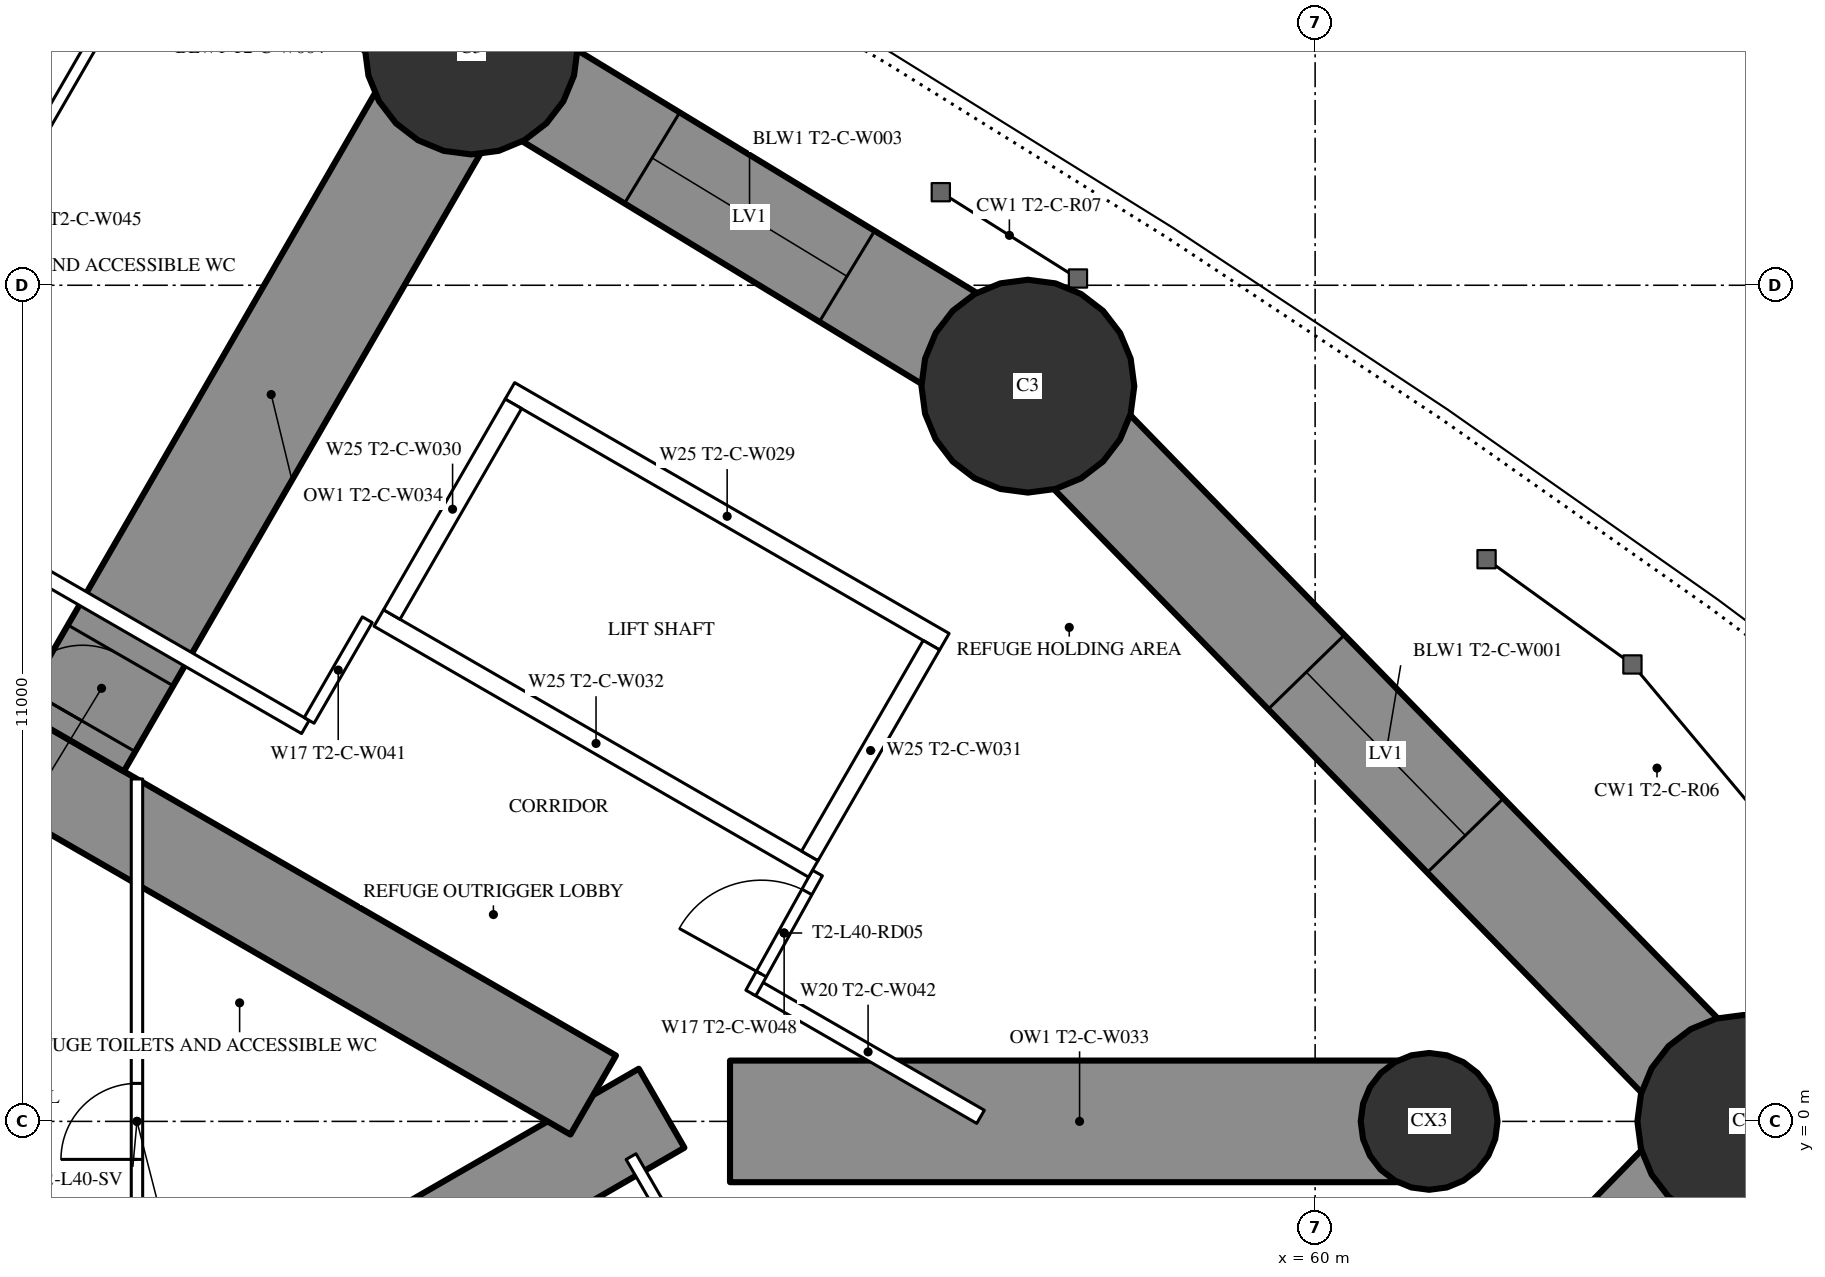
"""IFC4 building model, lengths in metres.
Left out: names, types, materials, properties, quantities, classifications, styles, units other than length and angle.
Written with IfcOpenShell. Run it as: python <this file> out.ifc"""

import sys

from ifc_helpers import new_model, si_unit, direction, frame, frame_2d, origin, origin_2d, place, context, subcontext, project, spatial, rectangle, circle, extrude, element, fill, save


model = new_model("IFC4")
c1 = context("Model", 3, precision=1e-05, world=origin(), true_north=direction((0.0, 1.0)))
c2 = subcontext(c1, "Body", "Model", "MODEL_VIEW")
j1 = project(units=[si_unit("LENGTHUNIT", "METRE"), si_unit("PLANEANGLEUNIT", "RADIAN")], contexts=[c1])
p1 = place(None, origin())
s1 = spatial("IfcSite", under=j1, at=p1, CompositionType="ELEMENT")
p2 = place(p1, origin())
s2 = spatial("IfcBuilding", under=s1, at=p2, CompositionType="ELEMENT")
p3 = place(p2, frame((0.0, 0.0, 152.7)))
s3 = spatial("IfcBuildingStorey", under=s2, at=p3, CompositionType="ELEMENT", Elevation=152.7)
for number, where, z_axis, x_axis in (
    (1, (65.64, 0.0, 0.0), (0.0, 0.0, 1.0), (1.0, 0.0, 0.0)),
    (2, (56.221, 9.672, 0.0), (0.0, 0.0, 1.0), (1.0, 0.0, 0.0)),
    (3, (48.897, 14.121, 0.0), (0.0, 0.0, 1.0), (1.0, 0.0, 0.0)),
):
    element("IfcColumn", number, at=place(p3, frame(where, z_axis=z_axis, x_axis=x_axis)), inside=s3, PredefinedType="COLUMN", context=c2, shape_type="SweptSolid", body=[
        extrude(circle(Radius=1.4, at=origin_2d()), origin(), (0.0, 0.0, 1.0), 3.6),
    ])
p4 = place(p3, frame((61.5, 0.0, 0.0), z_axis=(0.0, 0.0, 1.0), x_axis=(1.0, 0.0, 0.0)))
e4 = element("IfcColumn", 4, at=p4, inside=s3, PredefinedType="COLUMN", context=c2, shape_type="SweptSolid", body=[
    extrude(circle(Radius=0.9, at=origin_2d()), origin(), (0.0, 0.0, 1.0), 3.6),
])
p5 = place(p3, frame((27.2, -13.8, 0.0), z_axis=(0.0, 0.0, 1.0), x_axis=(0.866027159892, 0.499996958321, 0.0)))
e5 = element("IfcWall", 5, at=p5, inside=s3, PredefinedType="SHEAR", context=c2, shape_type="SweptSolid", body=[
    extrude(rectangle(XDim=27.947, YDim=1.2, at=frame_2d((13.973, 0.0))), origin(), (0.0, 0.0, 1.0), 3.6),
])
p6 = place(p5, frame((4.6, 0.0, 0.0)))
e6 = element("IfcOpeningElement", 6, at=p6, cuts=e5, PredefinedType="OPENING", context=c2, shape_type="SweptSolid", body=[
    extrude(rectangle(XDim=1.0, YDim=2.2, at=frame_2d((0.5, 1.1))), frame((0.0, 0.61, 0.0), z_axis=(0.0, -1.0, 0.0), x_axis=(1.0, 0.0, 0.0)), (0.0, 0.0, 1.0), 1.22),
])
p7 = place(p5, frame((13.568, 0.0, 0.0)))
e7 = element("IfcOpeningElement", 7, at=p7, cuts=e5, PredefinedType="OPENING", context=c2, shape_type="SweptSolid", body=[
    extrude(rectangle(XDim=1.8, YDim=2.04, at=frame_2d((0.9, 1.02))), frame((0.0, 0.61, 0.0), z_axis=(0.0, -1.0, 0.0), x_axis=(1.0, 0.0, 0.0)), (0.0, 0.0, 1.0), 1.22),
])
p8 = place(p3, frame((27.2, 13.8, 0.0), z_axis=(0.0, 0.0, 1.0), x_axis=(0.866024515034, -0.500001539357, 0.0)))
e8 = element("IfcWall", 8, at=p8, inside=s3, PredefinedType="SHEAR", context=c2, shape_type="SweptSolid", body=[
    extrude(rectangle(XDim=26.907, YDim=1.2, at=frame_2d((13.454, 0.0))), origin(), (0.0, 0.0, 1.0), 3.6),
])
p9 = place(p8, frame((4.6, 0.0, 0.0)))
e9 = element("IfcOpeningElement", 9, at=p9, cuts=e8, PredefinedType="OPENING", context=c2, shape_type="SweptSolid", body=[
    extrude(rectangle(XDim=1.0, YDim=2.2, at=frame_2d((0.5, 1.1))), frame((0.0, 0.61, 0.0), z_axis=(0.0, -1.0, 0.0), x_axis=(1.0, 0.0, 0.0)), (0.0, 0.0, 1.0), 1.22),
])
p10 = place(p8, frame((13.568, 0.0, 0.0)))
e10 = element("IfcOpeningElement", 10, at=p10, cuts=e8, PredefinedType="OPENING", context=c2, shape_type="SweptSolid", body=[
    extrude(rectangle(XDim=1.8, YDim=2.04, at=frame_2d((0.9, 1.02))), frame((0.0, 0.61, 0.0), z_axis=(0.0, -1.0, 0.0), x_axis=(1.0, 0.0, 0.0)), (0.0, 0.0, 1.0), 1.22),
])
p11 = place(p3, frame((52.302, 0.0, 0.0), z_axis=(0.0, 0.0, 1.0), x_axis=(1.0, 0.0, 0.0)))
e11 = element("IfcWall", 11, at=p11, inside=s3, PredefinedType="SHEAR", context=c2, shape_type="SweptSolid", body=[
    extrude(rectangle(XDim=9.198, YDim=1.6, at=frame_2d((4.599, 0.0))), origin(), (0.0, 0.0, 1.0), 3.6),
])
p12 = place(p3, frame((43.634, 5.004, 0.0), z_axis=(0.0, 0.0, 1.0), x_axis=(0.499995493849, 0.866028005396, 0.0)))
e12 = element("IfcWall", 12, at=p12, inside=s3, PredefinedType="SHEAR", context=c2, shape_type="SweptSolid", body=[
    extrude(rectangle(XDim=10.526, YDim=1.6, at=frame_2d((5.263, 0.0))), origin(), (0.0, 0.0, 1.0), 3.6),
])
p13 = place(p12, frame((0.3, 0.0, 0.0)))
e13 = element("IfcOpeningElement", 13, at=p13, cuts=e12, PredefinedType="OPENING", context=c2, shape_type="SweptSolid", body=[
    extrude(rectangle(XDim=1.0, YDim=2.2, at=frame_2d((0.5, 1.1))), frame((0.0, 0.81, 0.0), z_axis=(0.0, -1.0, 0.0), x_axis=(1.0, 0.0, 0.0)), (0.0, 0.0, 1.0), 1.62),
])
p14 = place(p3, frame((56.221, -9.672, 0.0), z_axis=(0.0, 0.0, 1.0), x_axis=(0.697649905443, 0.716438838587, 0.0)))
e14 = element("IfcWall", 14, at=p14, inside=s3, PredefinedType="SHEAR", context=c2, shape_type="SweptSolid", body=[
    extrude(rectangle(XDim=13.501, YDim=1.4, at=frame_2d((6.75, 0.0))), origin(), (0.0, 0.0, 1.0), 3.6),
])
p15 = place(p14, frame((5.25, 0.0, 0.6)))
e15 = element("IfcOpeningElement", 15, at=p15, cuts=e14, PredefinedType="OPENING", context=c2, shape_type="SweptSolid", body=[
    extrude(rectangle(XDim=3.0, YDim=1.2, at=frame_2d((1.5, 0.6))), frame((0.0, 0.71, 0.0), z_axis=(0.0, -1.0, 0.0), x_axis=(1.0, 0.0, 0.0)), (0.0, 0.0, 1.0), 1.42),
])
p16 = place(p3, frame((65.64, 0.0, 0.0), z_axis=(0.0, 0.0, 1.0), x_axis=(-0.697649905443, 0.716438838587, 0.0)))
e16 = element("IfcWall", 16, at=p16, inside=s3, PredefinedType="SHEAR", context=c2, shape_type="SweptSolid", body=[
    extrude(rectangle(XDim=13.501, YDim=1.4, at=frame_2d((6.75, 0.0))), origin(), (0.0, 0.0, 1.0), 3.6),
])
p17 = place(p16, frame((5.25, 0.0, 0.6)))
e17 = element("IfcOpeningElement", 17, at=p17, cuts=e16, PredefinedType="OPENING", context=c2, shape_type="SweptSolid", body=[
    extrude(rectangle(XDim=3.0, YDim=1.2, at=frame_2d((1.5, 0.6))), frame((0.0, 0.71, 0.0), z_axis=(0.0, -1.0, 0.0), x_axis=(1.0, 0.0, 0.0)), (0.0, 0.0, 1.0), 1.42),
])
p18 = place(p3, frame((56.221, 9.672, 0.0), z_axis=(0.0, 0.0, 1.0), x_axis=(-0.854692251129, 0.519135007353, 0.0)))
e18 = element("IfcWall", 18, at=p18, inside=s3, PredefinedType="SHEAR", context=c2, shape_type="SweptSolid", body=[
    extrude(rectangle(XDim=8.569, YDim=1.4, at=frame_2d((4.284, 0.0))), origin(), (0.0, 0.0, 1.0), 3.6),
])
p19 = place(p18, frame((2.784, 0.0, 0.6)))
e19 = element("IfcOpeningElement", 19, at=p19, cuts=e18, PredefinedType="OPENING", context=c2, shape_type="SweptSolid", body=[
    extrude(rectangle(XDim=3.0, YDim=1.2, at=frame_2d((1.5, 0.6))), frame((0.0, 0.71, 0.0), z_axis=(0.0, -1.0, 0.0), x_axis=(1.0, 0.0, 0.0)), (0.0, 0.0, 1.0), 1.42),
])
p20 = place(p3, frame((48.897, 14.121, 0.0), z_axis=(0.0, 0.0, 1.0), x_axis=(-0.878404597051, 0.477917737566, 0.0)))
e20 = element("IfcWall", 20, at=p20, inside=s3, PredefinedType="SHEAR", context=c2, shape_type="SweptSolid", body=[
    extrude(rectangle(XDim=4.285, YDim=1.4, at=frame_2d((2.143, 0.0))), origin(), (0.0, 0.0, 1.0), 3.6),
])
p21 = place(p3, frame((55.583, -8.401, 0.0), z_axis=(0.0, 0.0, 1.0), x_axis=(-0.499997575924, 0.866026803321, 0.0)))
e21 = element("IfcWall", 21, at=p21, inside=s3, PredefinedType="PARTITIONING", context=c2, shape_type="SweptSolid", body=[
    extrude(rectangle(XDim=9.167, YDim=0.15, at=frame_2d((4.583, 0.0))), origin(), (0.0, 0.0, 1.0), 3.35),
])
p22 = place(p21, frame((4.083, 0.0, 0.0)))
e22 = element("IfcOpeningElement", 22, at=p22, cuts=e21, PredefinedType="OPENING", context=c2, shape_type="SweptSolid", body=[
    extrude(rectangle(XDim=1.0, YDim=2.2, at=frame_2d((0.5, 1.1))), frame((0.0, 0.085, 0.0), z_axis=(0.0, -1.0, 0.0), x_axis=(1.0, 0.0, 0.0)), (0.0, 0.0, 1.0), 0.17),
])
p23 = place(p3, frame((40.769, 8.737, 0.0), z_axis=(0.0, 0.0, 1.0), x_axis=(0.500013115284, 0.866017831539, 0.0)))
e23 = element("IfcWall", 23, at=p23, inside=s3, PredefinedType="PARTITIONING", context=c2, shape_type="SweptSolid", body=[
    extrude(rectangle(XDim=7.198, YDim=0.15, at=frame_2d((3.599, 0.0))), origin(), (0.0, 0.0, 1.0), 2.4),
])
p24 = place(p3, frame((36.834, 10.894, 0.0), z_axis=(0.0, 0.0, 1.0), x_axis=(0.866031655879, -0.499989170898, 0.0)))
e24 = element("IfcWall", 24, at=p24, inside=s3, PredefinedType="PARTITIONING", context=c2, shape_type="SweptSolid", body=[
    extrude(rectangle(XDim=11.41, YDim=0.2, at=frame_2d((5.705, 0.0))), origin(), (0.0, 0.0, 1.0), 3.35),
])
p25 = place(p24, frame((5.323, 0.0, 0.0)))
e25 = element("IfcOpeningElement", 25, at=p25, cuts=e24, PredefinedType="OPENING", context=c2, shape_type="SweptSolid", body=[
    extrude(rectangle(XDim=1.8, YDim=2.04, at=frame_2d((0.9, 1.02))), frame((0.0, 0.11, 0.0), z_axis=(0.0, -1.0, 0.0), x_axis=(1.0, 0.0, 0.0)), (0.0, 0.0, 1.0), 0.22),
])
p26 = place(p3, frame((52.639, 1.769, 0.0), z_axis=(0.0, 0.0, 1.0), x_axis=(0.866027340901, -0.4999966448, 0.0)))
e26 = element("IfcWall", 26, at=p26, inside=s3, PredefinedType="PARTITIONING", context=c2, shape_type="SweptSolid", body=[
    extrude(rectangle(XDim=3.417, YDim=0.2, at=frame_2d((1.708, 0.0))), origin(), (0.0, 0.0, 1.0), 3.35),
])
p27 = place(p3, frame((52.576, 1.689, 0.0), z_axis=(0.0, 0.0, 1.0), x_axis=(0.485482130951, 0.874246590229, 0.0)))
e27 = element("IfcWall", 27, at=p27, inside=s3, PredefinedType="PARTITIONING", context=c2, shape_type="SweptSolid", body=[
    extrude(rectangle(XDim=1.805, YDim=0.15, at=frame_2d((0.902, 0.0))), origin(), (0.0, 0.0, 1.0), 3.35),
])
p28 = place(p27, frame((0.285, 0.0, 0.0)))
e28 = element("IfcOpeningElement", 28, at=p28, cuts=e27, PredefinedType="OPENING", context=c2, shape_type="SweptSolid", body=[
    extrude(rectangle(XDim=1.235, YDim=2.2, at=frame_2d((0.618, 1.1))), frame((0.0, 0.085, 0.0), z_axis=(0.0, -1.0, 0.0), x_axis=(1.0, 0.0, 0.0)), (0.0, 0.0, 1.0), 0.17),
])
p29 = place(p3, frame((46.765, 5.275, 0.0), z_axis=(0.0, 0.0, 1.0), x_axis=(0.499915892944, 0.866073957571, 0.0)))
e29 = element("IfcWall", 29, at=p29, inside=s3, PredefinedType="PARTITIONING", context=c2, shape_type="SweptSolid", body=[
    extrude(rectangle(XDim=1.53, YDim=0.15, at=frame_2d((0.765, 0.0))), origin(), (0.0, 0.0, 1.0), 3.35),
])
p30 = place(p3, frame((44.5, -4.505, 0.0), z_axis=(0.0, 0.0, 1.0), x_axis=(0.0, 1.0, 0.0)))
e30 = element("IfcWall", 30, at=p30, inside=s3, PredefinedType="PARTITIONING", context=c2, shape_type="SweptSolid", body=[
    extrude(rectangle(XDim=9.009, YDim=0.15, at=frame_2d((4.505, 0.0))), origin(), (0.0, 0.0, 1.0), 3.35),
])
p31 = place(p30, frame((4.005, 0.0, 0.0)))
e31 = element("IfcOpeningElement", 31, at=p31, cuts=e30, PredefinedType="OPENING", context=c2, shape_type="SweptSolid", body=[
    extrude(rectangle(XDim=1.0, YDim=2.2, at=frame_2d((0.5, 1.1))), frame((0.0, 0.085, 0.0), z_axis=(0.0, -1.0, 0.0), x_axis=(1.0, 0.0, 0.0)), (0.0, 0.0, 1.0), 0.17),
])
for number, where, z_axis, x_axis in (
    (32, (47.681, 6.622, 0.0), (0.0, 0.0, 1.0), (0.866, -0.5, 0.0)),
    (33, (49.406, 9.611, 0.0), (0.0, 0.0, 1.0), (0.866, -0.5, 0.0)),
):
    element("IfcWall", number, at=place(p3, frame(where, z_axis=z_axis, x_axis=x_axis)), inside=s3, PredefinedType="PARTITIONING", context=c2, shape_type="SweptSolid", body=[
        extrude(rectangle(XDim=6.6, YDim=0.25, at=frame_2d((3.3, 0.0))), origin(), (0.0, 0.0, 1.0), 3.35),
    ])
p32 = place(p3, frame((47.852, 6.668, 0.0), z_axis=(0.0, 0.0, 1.0), x_axis=(0.499929347863, 0.866066190972, 0.0)))
e34 = element("IfcWall", 34, at=p32, inside=s3, PredefinedType="PARTITIONING", context=c2, shape_type="SweptSolid", body=[
    extrude(rectangle(XDim=3.201, YDim=0.25, at=frame_2d((1.6, 0.0))), origin(), (0.0, 0.0, 1.0), 3.35),
])
p33 = place(p3, frame((53.352, 3.493, 0.0), z_axis=(0.0, 0.0, 1.0), x_axis=(0.499872130319, 0.866099216793, 0.0)))
e35 = element("IfcWall", 35, at=p33, inside=s3, PredefinedType="PARTITIONING", context=c2, shape_type="SweptSolid", body=[
    extrude(rectangle(XDim=3.2, YDim=0.25, at=frame_2d((1.6, 0.0))), origin(), (0.0, 0.0, 1.0), 3.35),
])
p34 = place(p17, origin())
e36 = element("IfcWindow", 36, at=p34, inside=s3, PartitioningType="SINGLE_PANEL", PredefinedType="WINDOW", context=c2, shape_type="SweptSolid", body=[
    extrude(rectangle(XDim=3.0, YDim=1.2, at=frame_2d((1.5, 0.6))), frame((0.0, 0.03, 0.0), z_axis=(0.0, -1.0, 0.0), x_axis=(1.0, 0.0, 0.0)), (0.0, 0.0, 1.0), 0.06),
])
fill(e17, e36)
p35 = place(p19, origin())
e37 = element("IfcWindow", 37, at=p35, inside=s3, PartitioningType="SINGLE_PANEL", PredefinedType="WINDOW", context=c2, shape_type="SweptSolid", body=[
    extrude(rectangle(XDim=3.0, YDim=1.2, at=frame_2d((1.5, 0.6))), frame((0.0, 0.03, 0.0), z_axis=(0.0, -1.0, 0.0), x_axis=(1.0, 0.0, 0.0)), (0.0, 0.0, 1.0), 0.06),
])
fill(e19, e37)
p36 = place(p13, origin())
e38 = element("IfcDoor", 38, at=p36, inside=s3, OperationType="SINGLE_SWING_LEFT", PredefinedType="DOOR", context=c2, shape_type="SweptSolid", body=[
    extrude(rectangle(XDim=1.0, YDim=2.2, at=frame_2d((0.5, 1.1))), frame((0.0, 0.025, 0.0), z_axis=(0.0, -1.0, 0.0), x_axis=(1.0, 0.0, 0.0)), (0.0, 0.0, 1.0), 0.05),
])
fill(e13, e38)
p37 = place(p28, origin())
e39 = element("IfcDoor", 39, at=p37, inside=s3, OperationType="SINGLE_SWING_LEFT", PredefinedType="DOOR", context=c2, shape_type="SweptSolid", body=[
    extrude(rectangle(XDim=1.235, YDim=2.2, at=frame_2d((0.618, 1.1))), frame((0.0, 0.025, 0.0), z_axis=(0.0, -1.0, 0.0), x_axis=(1.0, 0.0, 0.0)), (0.0, 0.0, 1.0), 0.05),
])
fill(e28, e39)
p38 = place(p31, origin())
e40 = element("IfcDoor", 40, at=p38, inside=s3, OperationType="SINGLE_SWING_LEFT", PredefinedType="DOOR", context=c2, shape_type="SweptSolid", body=[
    extrude(rectangle(XDim=1.0, YDim=2.2, at=frame_2d((0.5, 1.1))), frame((0.0, 0.025, 0.0), z_axis=(0.0, -1.0, 0.0), x_axis=(1.0, 0.0, 0.0)), (0.0, 0.0, 1.0), 0.05),
])
fill(e31, e40)
save(model, sys.argv[1])
